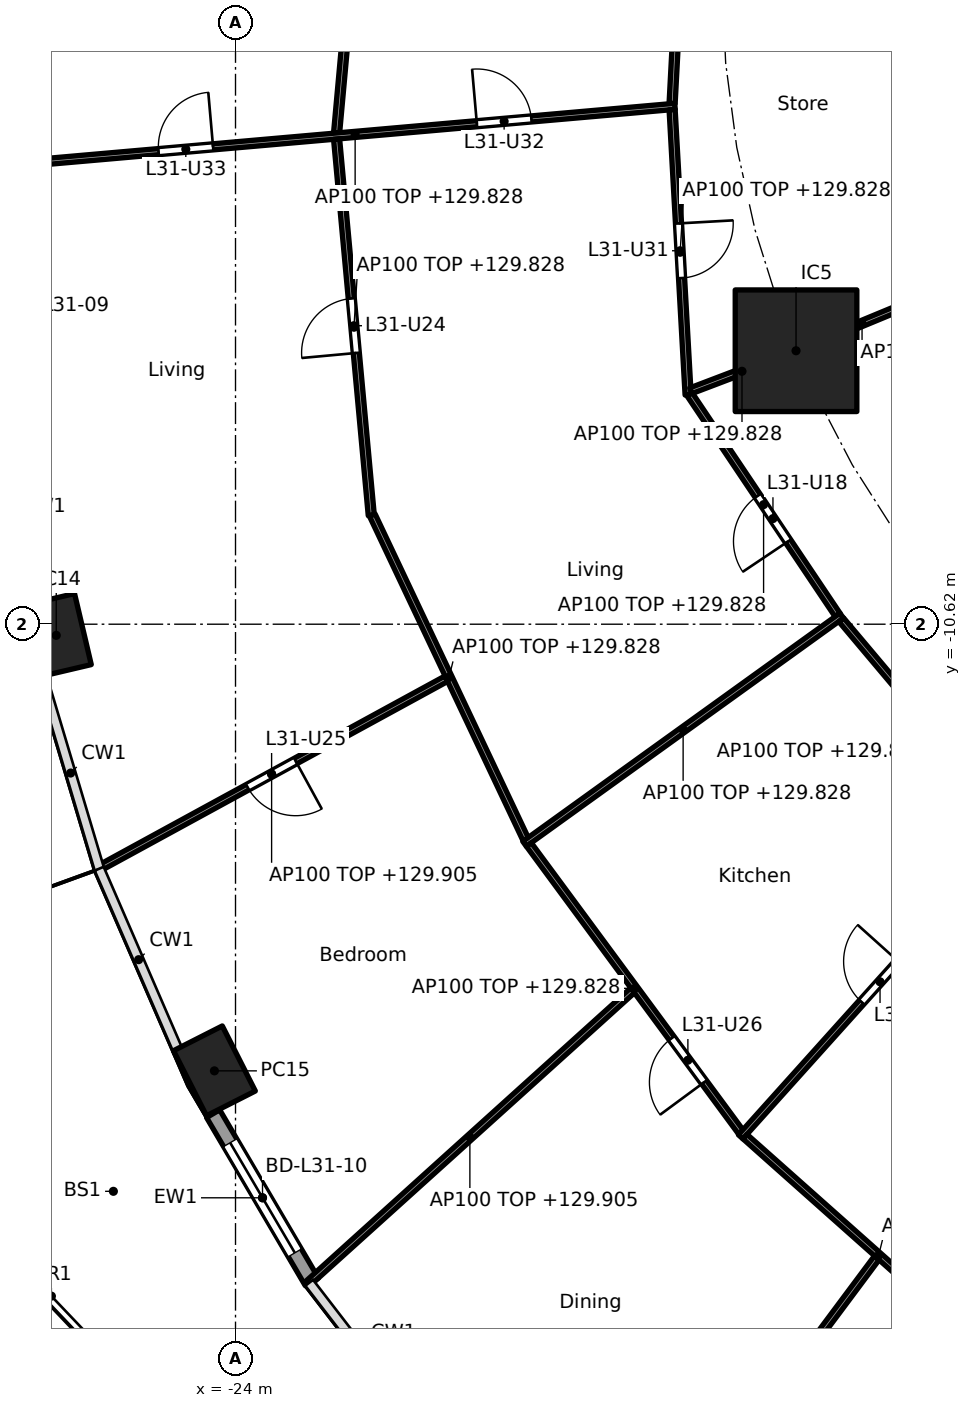
"""IFC4 building model, lengths in metres.
Left out: names, types, materials, properties, quantities, classifications, styles, units other than length and angle.
Written with IfcOpenShell. Run it as: python <this file> out.ifc"""

import sys

from ifc_helpers import new_model, si_unit, direction, frame, frame_2d, origin, origin_2d, place, context, subcontext, project, spatial, rectangle, hollow_rectangle, extrude, element, fill, save


model = new_model("IFC4")
c1 = context("Model", 3, precision=1e-05, world=origin(), true_north=direction((0.0, 1.0)))
c2 = subcontext(c1, "Body", "Model", "MODEL_VIEW")
j1 = project(units=[si_unit("LENGTHUNIT", "METRE"), si_unit("PLANEANGLEUNIT", "RADIAN")], contexts=[c1])
p1 = place(None, origin())
s1 = spatial("IfcSite", under=j1, at=p1, CompositionType="ELEMENT")
p2 = place(p1, origin())
s2 = spatial("IfcBuilding", under=s1, at=p2, CompositionType="ELEMENT")
p3 = place(p2, frame((0.0, 0.0, 127.0)))
s3 = spatial("IfcBuildingStorey", under=s2, at=p3, CompositionType="ELEMENT", Elevation=127.0)
for number, where, z_axis, x_axis in (
    (1, (-26.948, -10.803, 0.0), (0.0, 0.0, 1.0), (0.229, -0.973, 0.0)),
    (2, (-24.347, -17.965, 0.0), (0.0, 0.0, 1.0), (0.452, -0.892, 0.0)),
):
    element("IfcColumn", number, at=place(p3, frame(where, z_axis=z_axis, x_axis=x_axis)), inside=s3, PredefinedType="COLUMN", context=c2, shape_type="SweptSolid", body=[
        extrude(hollow_rectangle(XDim=1.2, YDim=0.9, WallThickness=0.04, at=origin_2d()), origin(), (0.0, 0.0, 1.0), 3.7),
    ])
p4 = place(p3, frame((-14.782, -6.123, 0.0), z_axis=(0.0, 0.0, 1.0), x_axis=(1.0, 0.0, 0.0)))
e3 = element("IfcColumn", 3, at=p4, inside=s3, PredefinedType="COLUMN", context=c2, shape_type="SweptSolid", body=[
    extrude(rectangle(XDim=2.0, YDim=2.0, at=origin_2d()), origin(), (0.0, 0.0, 1.0), 3.7),
])
p5 = place(p3, frame((-22.744, -21.436, 0.0), z_axis=(0.0, 0.0, 1.0), x_axis=(-0.506314982873, 0.862348617508, 0.0)))
e4 = element("IfcWall", 4, at=p5, inside=s3, PredefinedType="SOLIDWALL", context=c2, shape_type="SweptSolid", body=[
    extrude(rectangle(XDim=3.208, YDim=0.25, at=frame_2d((1.604, 0.0))), origin(), (0.0, 0.0, 1.0), 3.44),
])
p6 = place(p5, frame((0.554, 0.0, 0.0)))
e5 = element("IfcOpeningElement", 5, at=p6, cuts=e4, PredefinedType="OPENING", context=c2, shape_type="SweptSolid", body=[
    extrude(rectangle(XDim=2.1, YDim=2.4, at=frame_2d((1.05, 1.2))), frame((0.0, 0.135, 0.0), z_axis=(0.0, -1.0, 0.0), x_axis=(1.0, 0.0, 0.0)), (0.0, 0.0, 1.0), 0.27),
])
p7 = place(p3, frame((-16.576, 2.585, 0.0), z_axis=(0.0, 0.0, 1.0), x_axis=(-0.052509224895, -0.998620439056, 0.0)))
e6 = element("IfcWall", 6, at=p7, inside=s3, PredefinedType="PARTITIONING", context=c2, shape_type="SweptSolid", body=[
    extrude(rectangle(XDim=4.649, YDim=0.1, at=frame_2d((2.325, 0.0))), origin(), (0.0, 0.0, 1.0), 2.828),
])
p8 = place(p3, frame((-21.777, 3.621, 0.0), z_axis=(0.0, 0.0, 1.0), x_axis=(-0.090606877484, -0.995886737412, 0.0)))
e7 = element("IfcWall", 7, at=p8, inside=s3, PredefinedType="PARTITIONING", context=c2, shape_type="SweptSolid", body=[
    extrude(rectangle(XDim=6.189, YDim=0.1, at=frame_2d((3.095, 0.0))), origin(), (0.0, 0.0, 1.0), 2.828),
])
p9 = place(p3, frame((-16.773, -2.104, 0.0), z_axis=(0.0, 0.0, 1.0), x_axis=(-0.996176206701, -0.087366842701, 0.0)))
e8 = element("IfcWall", 8, at=p9, inside=s3, PredefinedType="PARTITIONING", context=c2, shape_type="SweptSolid", body=[
    extrude(rectangle(XDim=10.56, YDim=0.1, at=frame_2d((5.28, 0.0))), origin(), (0.0, 0.0, 1.0), 2.828),
])
p10 = place(p9, frame((2.37, 0.0, 0.0)))
e9 = element("IfcOpeningElement", 9, at=p10, cuts=e8, PredefinedType="OPENING", context=c2, shape_type="SweptSolid", body=[
    extrude(rectangle(XDim=0.9, YDim=2.1, at=frame_2d((0.45, 1.05))), frame((0.0, 0.06, 0.0), z_axis=(0.0, -1.0, 0.0), x_axis=(1.0, 0.0, 0.0)), (0.0, 0.0, 1.0), 0.12),
])
p11 = place(p9, frame((7.625, 0.0, 0.0)))
e10 = element("IfcOpeningElement", 10, at=p11, cuts=e8, PredefinedType="OPENING", context=c2, shape_type="SweptSolid", body=[
    extrude(rectangle(XDim=0.9, YDim=2.1, at=frame_2d((0.45, 1.05))), frame((0.0, 0.06, 0.0), z_axis=(0.0, -1.0, 0.0), x_axis=(1.0, 0.0, 0.0)), (0.0, 0.0, 1.0), 0.12),
])
p12 = place(p3, frame((-16.82, -2.158, 0.0), z_axis=(0.0, 0.0, 1.0), x_axis=(0.055967931845, -0.998432566879, 0.0)))
e11 = element("IfcWall", 11, at=p12, inside=s3, PredefinedType="PARTITIONING", context=c2, shape_type="SweptSolid", body=[
    extrude(rectangle(XDim=4.698, YDim=0.1, at=frame_2d((2.349, 0.0))), origin(), (0.0, 0.0, 1.0), 2.828),
])
p13 = place(p12, frame((1.874, 0.0, 0.0)))
e12 = element("IfcOpeningElement", 12, at=p13, cuts=e11, PredefinedType="OPENING", context=c2, shape_type="SweptSolid", body=[
    extrude(rectangle(XDim=0.9, YDim=2.1, at=frame_2d((0.45, 1.05))), frame((0.0, 0.06, 0.0), z_axis=(0.0, -1.0, 0.0), x_axis=(1.0, 0.0, 0.0)), (0.0, 0.0, 1.0), 0.12),
])
p14 = place(p3, frame((-22.338, -2.642, 0.0), z_axis=(0.0, 0.0, 1.0), x_axis=(0.091768304523, -0.995780386574, 0.0)))
e13 = element("IfcWall", 13, at=p14, inside=s3, PredefinedType="PARTITIONING", context=c2, shape_type="SweptSolid", body=[
    extrude(rectangle(XDim=6.215, YDim=0.1, at=frame_2d((3.107, 0.0))), origin(), (0.0, 0.0, 1.0), 2.828),
])
p15 = place(p14, frame((2.632, 0.0, 0.0)))
e14 = element("IfcOpeningElement", 14, at=p15, cuts=e13, PredefinedType="OPENING", context=c2, shape_type="SweptSolid", body=[
    extrude(rectangle(XDim=0.9, YDim=2.1, at=frame_2d((0.45, 1.05))), frame((0.0, 0.06, 0.0), z_axis=(0.0, -1.0, 0.0), x_axis=(1.0, 0.0, 0.0)), (0.0, 0.0, 1.0), 0.12),
])
p16 = place(p3, frame((-12.657, -5.243, 0.0), z_axis=(0.0, 0.0, 1.0), x_axis=(-0.923864733477, -0.382719158442, 0.0)))
e15 = element("IfcWall", 15, at=p16, inside=s3, PredefinedType="PARTITIONING", context=c2, shape_type="SweptSolid", body=[
    extrude(rectangle(XDim=2.25, YDim=0.1, at=frame_2d((1.125, 0.0))), origin(), (0.0, 0.0, 1.0), 3.44),
])
p17 = place(p3, frame((-14.829, -6.141, 0.0), z_axis=(0.0, 0.0, 1.0), x_axis=(-0.934704367514, -0.355426146128, 0.0)))
e16 = element("IfcWall", 16, at=p17, inside=s3, PredefinedType="PARTITIONING", context=c2, shape_type="SweptSolid", body=[
    extrude(rectangle(XDim=1.802, YDim=0.1, at=frame_2d((0.901, 0.0))), origin(), (0.0, 0.0, 1.0), 2.828),
])
p18 = place(p3, frame((-16.532, -6.84, 0.0), z_axis=(0.0, 0.0, 1.0), x_axis=(0.556994773624, -0.830515997531, 0.0)))
e17 = element("IfcWall", 17, at=p18, inside=s3, PredefinedType="PARTITIONING", context=c2, shape_type="SweptSolid", body=[
    extrude(rectangle(XDim=4.366, YDim=0.1, at=frame_2d((2.183, 0.0))), origin(), (0.0, 0.0, 1.0), 2.828),
])
p19 = place(p18, frame((2.01, 0.0, 0.0)))
e18 = element("IfcOpeningElement", 18, at=p19, cuts=e17, PredefinedType="OPENING", context=c2, shape_type="SweptSolid", body=[
    extrude(rectangle(XDim=0.9, YDim=2.1, at=frame_2d((0.45, 1.05))), frame((0.0, 0.06, 0.0), z_axis=(0.0, -1.0, 0.0), x_axis=(1.0, 0.0, 0.0)), (0.0, 0.0, 1.0), 0.12),
])
p20 = place(p3, frame((-21.75, -8.826, 0.0), z_axis=(0.0, 0.0, 1.0), x_axis=(0.427739388908, -0.903902104863, 0.0)))
e19 = element("IfcWall", 19, at=p20, inside=s3, PredefinedType="PARTITIONING", context=c2, shape_type="SweptSolid", body=[
    extrude(rectangle(XDim=5.899, YDim=0.1, at=frame_2d((2.949, 0.0))), origin(), (0.0, 0.0, 1.0), 2.828),
])
p21 = place(p3, frame((-20.533, -11.516, 0.0), z_axis=(0.0, 0.0, 1.0), x_axis=(-0.877731656478, -0.479152521872, 0.0)))
e20 = element("IfcWall", 20, at=p21, inside=s3, PredefinedType="PARTITIONING", context=c2, shape_type="SweptSolid", body=[
    extrude(rectangle(XDim=6.548, YDim=0.1, at=frame_2d((3.274, 0.0))), origin(), (0.0, 0.0, 1.0), 2.905),
])
p22 = place(p21, frame((2.824, 0.0, 0.0)))
e21 = element("IfcOpeningElement", 21, at=p22, cuts=e20, PredefinedType="OPENING", context=c2, shape_type="SweptSolid", body=[
    extrude(rectangle(XDim=0.9, YDim=2.1, at=frame_2d((0.45, 1.05))), frame((0.0, 0.06, 0.0), z_axis=(0.0, -1.0, 0.0), x_axis=(1.0, 0.0, 0.0)), (0.0, 0.0, 1.0), 0.12),
])
p23 = place(p3, frame((-14.031, -10.479, 0.0), z_axis=(0.0, 0.0, 1.0), x_axis=(-0.811653955345, -0.584138559567, 0.0)))
e22 = element("IfcWall", 22, at=p23, inside=s3, PredefinedType="PARTITIONING", context=c2, shape_type="SweptSolid", body=[
    extrude(rectangle(XDim=6.426, YDim=0.1, at=frame_2d((3.213, 0.0))), origin(), (0.0, 0.0, 1.0), 2.828),
])
p24 = place(p3, frame((-14.04, -10.547, 0.0), z_axis=(0.0, 0.0, 1.0), x_axis=(0.644036028289, -0.764995159635, 0.0)))
e23 = element("IfcWall", 23, at=p24, inside=s3, PredefinedType="PARTITIONING", context=c2, shape_type="SweptSolid", body=[
    extrude(rectangle(XDim=4.448, YDim=0.1, at=frame_2d((2.224, 0.0))), origin(), (0.0, 0.0, 1.0), 2.828),
])
p25 = place(p3, frame((-19.176, -14.244, 0.0), z_axis=(0.0, 0.0, 1.0), x_axis=(0.593532053206, -0.80481035146, 0.0)))
e24 = element("IfcWall", 24, at=p25, inside=s3, PredefinedType="PARTITIONING", context=c2, shape_type="SweptSolid", body=[
    extrude(rectangle(XDim=5.876, YDim=0.1, at=frame_2d((2.938, 0.0))), origin(), (0.0, 0.0, 1.0), 2.828),
])
p26 = place(p25, frame((3.957, 0.0, 0.0)))
e25 = element("IfcOpeningElement", 25, at=p26, cuts=e24, PredefinedType="OPENING", context=c2, shape_type="SweptSolid", body=[
    extrude(rectangle(XDim=0.9, YDim=2.1, at=frame_2d((0.45, 1.05))), frame((0.0, 0.06, 0.0), z_axis=(0.0, -1.0, 0.0), x_axis=(1.0, 0.0, 0.0)), (0.0, 0.0, 1.0), 0.12),
])
p27 = place(p3, frame((-17.47, -16.642, 0.0), z_axis=(0.0, 0.0, 1.0), x_axis=(-0.742345465337, -0.670017320742, 0.0)))
e26 = element("IfcWall", 26, at=p27, inside=s3, PredefinedType="PARTITIONING", context=c2, shape_type="SweptSolid", body=[
    extrude(rectangle(XDim=7.21, YDim=0.1, at=frame_2d((3.605, 0.0))), origin(), (0.0, 0.0, 1.0), 2.905),
])
p28 = place(p3, frame((-7.725, -10.186, 0.0), z_axis=(0.0, 0.0, 1.0), x_axis=(-0.668498346565, -0.743713628112, 0.0)))
e27 = element("IfcWall", 27, at=p28, inside=s3, PredefinedType="PARTITIONING", context=c2, shape_type="SweptSolid", body=[
    extrude(rectangle(XDim=11.919, YDim=0.1, at=frame_2d((5.959, 0.0))), origin(), (0.0, 0.0, 1.0), 2.756),
])
p29 = place(p28, frame((2.106, 0.0, 0.0)))
e28 = element("IfcOpeningElement", 28, at=p29, cuts=e27, PredefinedType="OPENING", context=c2, shape_type="SweptSolid", body=[
    extrude(rectangle(XDim=0.9, YDim=2.1, at=frame_2d((0.45, 1.05))), frame((0.0, 0.06, 0.0), z_axis=(0.0, -1.0, 0.0), x_axis=(1.0, 0.0, 0.0)), (0.0, 0.0, 1.0), 0.12),
])
p30 = place(p28, frame((8.041, 0.0, 0.0)))
e29 = element("IfcOpeningElement", 29, at=p30, cuts=e27, PredefinedType="OPENING", context=c2, shape_type="SweptSolid", body=[
    extrude(rectangle(XDim=0.9, YDim=2.1, at=frame_2d((0.45, 1.05))), frame((0.0, 0.06, 0.0), z_axis=(0.0, -1.0, 0.0), x_axis=(1.0, 0.0, 0.0)), (0.0, 0.0, 1.0), 0.12),
])
p31 = place(p3, frame((-15.622, -19.046, 0.0), z_axis=(0.0, 0.0, 1.0), x_axis=(0.747342891849, -0.664438561496, 0.0)))
e30 = element("IfcWall", 30, at=p31, inside=s3, PredefinedType="PARTITIONING", context=c2, shape_type="SweptSolid", body=[
    extrude(rectangle(XDim=5.881, YDim=0.1, at=frame_2d((2.94, 0.0))), origin(), (0.0, 0.0, 1.0), 2.828),
])
p32 = place(p31, frame((3.961, 0.0, 0.0)))
e31 = element("IfcOpeningElement", 31, at=p32, cuts=e30, PredefinedType="OPENING", context=c2, shape_type="SweptSolid", body=[
    extrude(rectangle(XDim=0.9, YDim=2.1, at=frame_2d((0.45, 1.05))), frame((0.0, 0.06, 0.0), z_axis=(0.0, -1.0, 0.0), x_axis=(1.0, 0.0, 0.0)), (0.0, 0.0, 1.0), 0.12),
])
p33 = place(p3, frame((-13.454, -21.04, 0.0), z_axis=(0.0, 0.0, 1.0), x_axis=(-0.597848033124, -0.801609461826, 0.0)))
e32 = element("IfcWall", 32, at=p33, inside=s3, PredefinedType="PARTITIONING", context=c2, shape_type="SweptSolid", body=[
    extrude(rectangle(XDim=7.486, YDim=0.1, at=frame_2d((3.743, 0.0))), origin(), (0.0, 0.0, 1.0), 2.905),
])
p34 = place(p6, origin())
e33 = element("IfcDoor", 33, at=p34, inside=s3, OperationType="SLIDING_TO_LEFT", PredefinedType="DOOR", context=c2, shape_type="SweptSolid", body=[
    extrude(rectangle(XDim=2.1, YDim=2.4, at=frame_2d((1.05, 1.2))), frame((0.0, 0.025, 0.0), z_axis=(0.0, -1.0, 0.0), x_axis=(1.0, 0.0, 0.0)), (0.0, 0.0, 1.0), 0.05),
])
fill(e5, e33)
p35 = place(p19, frame((0.9, 0.0, 0.0), x_axis=(-1.0, 0.0, 0.0)))
e34 = element("IfcDoor", 34, at=p35, inside=s3, OperationType="SINGLE_SWING_LEFT", PredefinedType="DOOR", context=c2, shape_type="SweptSolid", body=[
    extrude(rectangle(XDim=0.9, YDim=2.1, at=frame_2d((0.45, 1.05))), frame((0.0, 0.025, 0.0), z_axis=(0.0, -1.0, 0.0), x_axis=(1.0, 0.0, 0.0)), (0.0, 0.0, 1.0), 0.05),
])
fill(e18, e34)
p36 = place(p30, frame((0.9, 0.0, 0.0), x_axis=(-1.0, 0.0, 0.0)))
e35 = element("IfcDoor", 35, at=p36, inside=s3, OperationType="SINGLE_SWING_RIGHT", PredefinedType="DOOR", context=c2, shape_type="SweptSolid", body=[
    extrude(rectangle(XDim=0.9, YDim=2.1, at=frame_2d((0.45, 1.05))), frame((0.0, 0.025, 0.0), z_axis=(0.0, -1.0, 0.0), x_axis=(1.0, 0.0, 0.0)), (0.0, 0.0, 1.0), 0.05),
])
fill(e29, e35)
p37 = place(p15, frame((0.9, 0.0, 0.0), x_axis=(-1.0, 0.0, 0.0)))
e36 = element("IfcDoor", 36, at=p37, inside=s3, OperationType="SINGLE_SWING_LEFT", PredefinedType="DOOR", context=c2, shape_type="SweptSolid", body=[
    extrude(rectangle(XDim=0.9, YDim=2.1, at=frame_2d((0.45, 1.05))), frame((0.0, 0.025, 0.0), z_axis=(0.0, -1.0, 0.0), x_axis=(1.0, 0.0, 0.0)), (0.0, 0.0, 1.0), 0.05),
])
fill(e14, e36)
p38 = place(p22, origin())
e37 = element("IfcDoor", 37, at=p38, inside=s3, OperationType="SINGLE_SWING_LEFT", PredefinedType="DOOR", context=c2, shape_type="SweptSolid", body=[
    extrude(rectangle(XDim=0.9, YDim=2.1, at=frame_2d((0.45, 1.05))), frame((0.0, 0.025, 0.0), z_axis=(0.0, -1.0, 0.0), x_axis=(1.0, 0.0, 0.0)), (0.0, 0.0, 1.0), 0.05),
])
fill(e21, e37)
p39 = place(p26, frame((0.9, 0.0, 0.0), x_axis=(-1.0, 0.0, 0.0)))
e38 = element("IfcDoor", 38, at=p39, inside=s3, OperationType="SINGLE_SWING_LEFT", PredefinedType="DOOR", context=c2, shape_type="SweptSolid", body=[
    extrude(rectangle(XDim=0.9, YDim=2.1, at=frame_2d((0.45, 1.05))), frame((0.0, 0.025, 0.0), z_axis=(0.0, -1.0, 0.0), x_axis=(1.0, 0.0, 0.0)), (0.0, 0.0, 1.0), 0.05),
])
fill(e25, e38)
p40 = place(p13, origin())
e39 = element("IfcDoor", 39, at=p40, inside=s3, OperationType="SINGLE_SWING_LEFT", PredefinedType="DOOR", context=c2, shape_type="SweptSolid", body=[
    extrude(rectangle(XDim=0.9, YDim=2.1, at=frame_2d((0.45, 1.05))), frame((0.0, 0.025, 0.0), z_axis=(0.0, -1.0, 0.0), x_axis=(1.0, 0.0, 0.0)), (0.0, 0.0, 1.0), 0.05),
])
fill(e12, e39)
p41 = place(p10, frame((0.9, 0.0, 0.0), x_axis=(-1.0, 0.0, 0.0)))
e40 = element("IfcDoor", 40, at=p41, inside=s3, OperationType="SINGLE_SWING_LEFT", PredefinedType="DOOR", context=c2, shape_type="SweptSolid", body=[
    extrude(rectangle(XDim=0.9, YDim=2.1, at=frame_2d((0.45, 1.05))), frame((0.0, 0.025, 0.0), z_axis=(0.0, -1.0, 0.0), x_axis=(1.0, 0.0, 0.0)), (0.0, 0.0, 1.0), 0.05),
])
fill(e9, e40)
p42 = place(p11, frame((0.9, 0.0, 0.0), x_axis=(-1.0, 0.0, 0.0)))
e41 = element("IfcDoor", 41, at=p42, inside=s3, OperationType="SINGLE_SWING_RIGHT", PredefinedType="DOOR", context=c2, shape_type="SweptSolid", body=[
    extrude(rectangle(XDim=0.9, YDim=2.1, at=frame_2d((0.45, 1.05))), frame((0.0, 0.025, 0.0), z_axis=(0.0, -1.0, 0.0), x_axis=(1.0, 0.0, 0.0)), (0.0, 0.0, 1.0), 0.05),
])
fill(e10, e41)
save(model, sys.argv[1])
